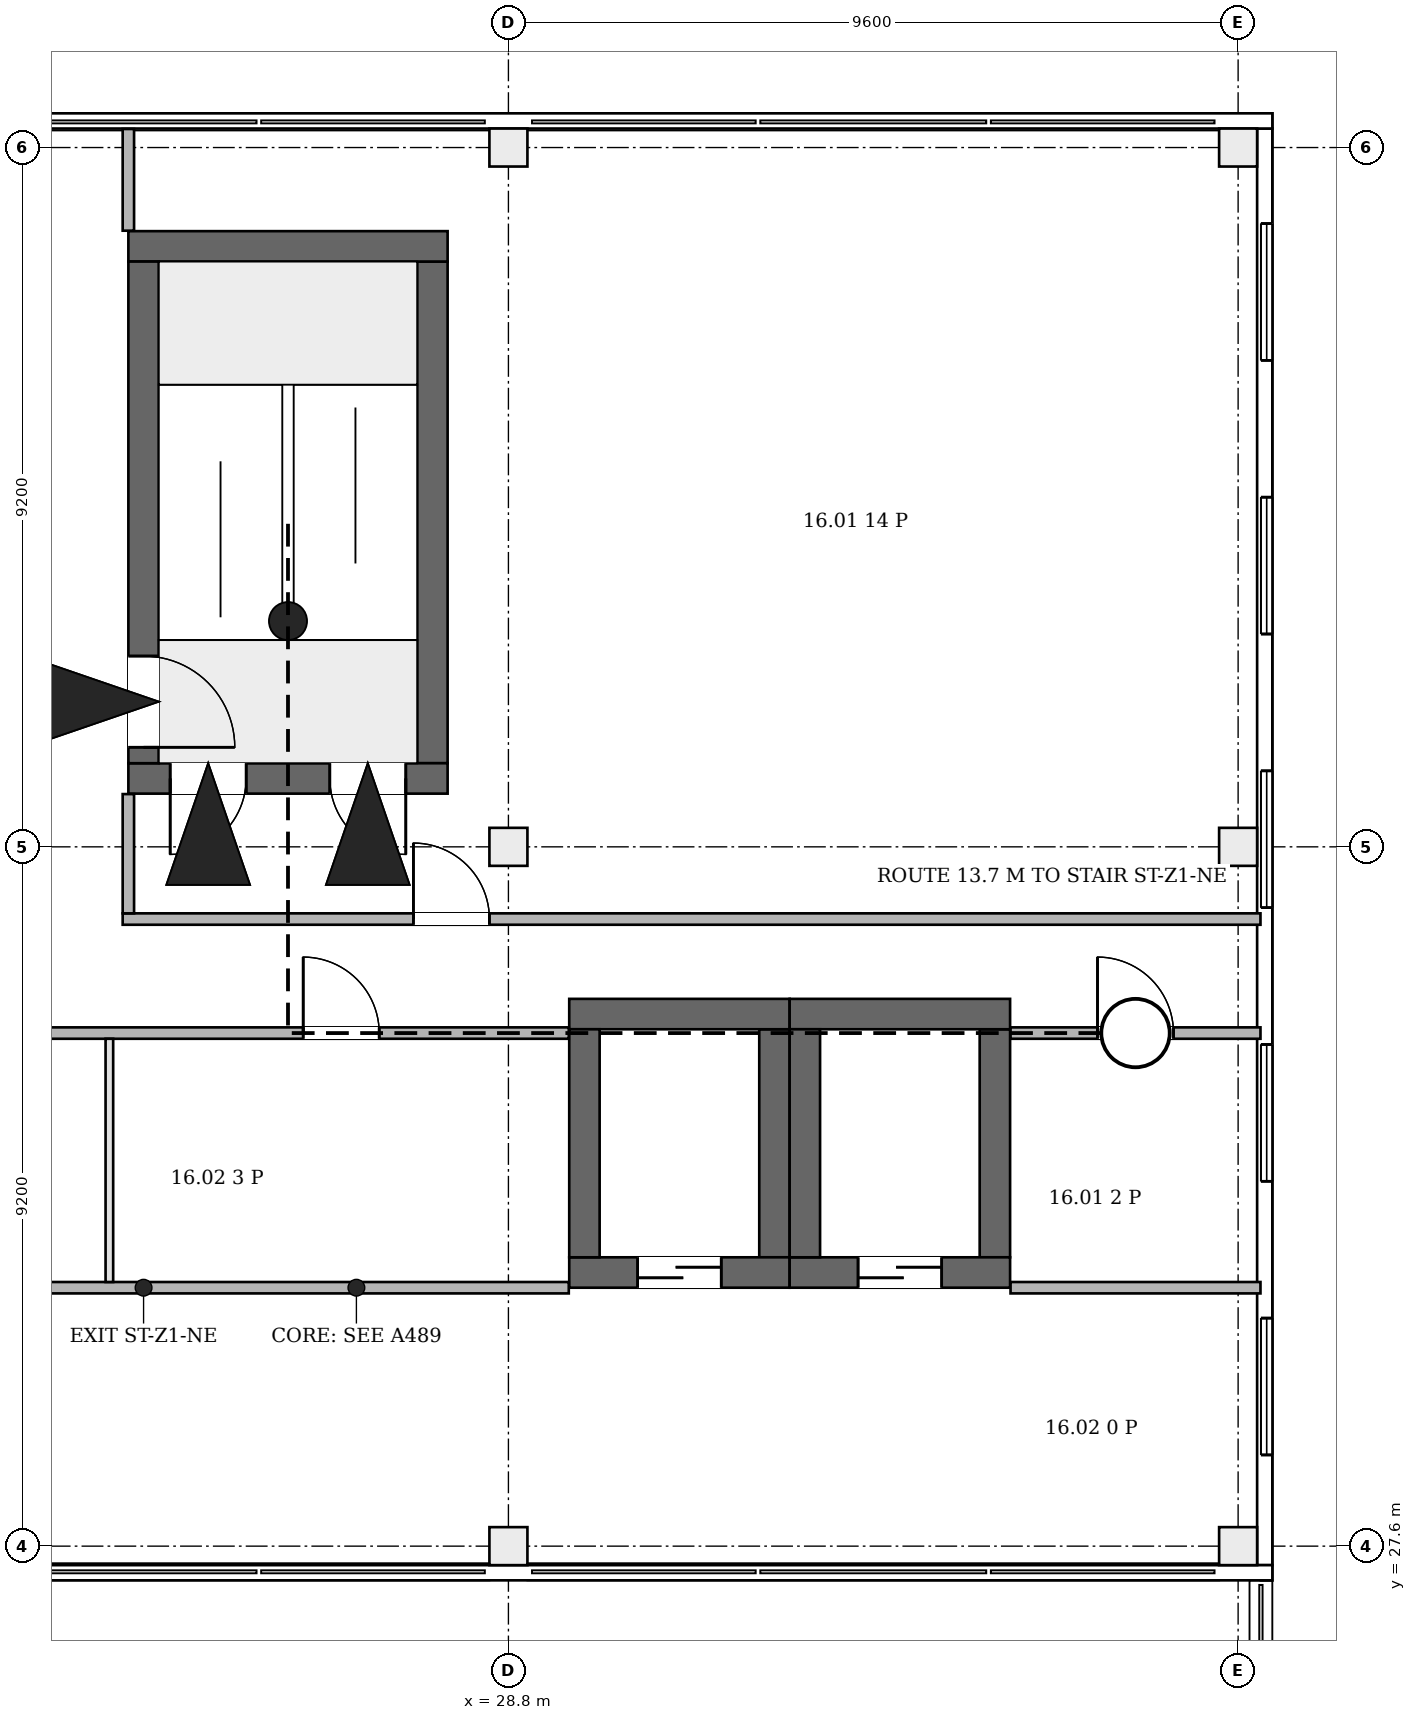
"""IFC4 building model, lengths in metres.
Left out: names, types, materials, properties, quantities, classifications, styles, units other than length and angle.
Written with IfcOpenShell. Run it as: python <this file> out.ifc"""

import sys

from ifc_helpers import new_model, si_unit, direction, frame, frame_2d, origin, origin_2d, place, context, subcontext, project, spatial, rectangle, extrude, element, fill, save


model = new_model("IFC4")
c1 = context("Model", 3, precision=1e-05, world=origin(), true_north=direction((0.0, 1.0)))
c2 = subcontext(c1, "Body", "Model", "MODEL_VIEW")
j1 = project(units=[si_unit("LENGTHUNIT", "METRE"), si_unit("PLANEANGLEUNIT", "RADIAN")], contexts=[c1])
p1 = place(None, origin())
s1 = spatial("IfcSite", under=j1, at=p1, CompositionType="ELEMENT")
p2 = place(p1, origin())
s2 = spatial("IfcBuilding", under=s1, at=p2, CompositionType="ELEMENT")
p3 = place(p2, frame((0.0, 0.0, 78.1)))
s3 = spatial("IfcBuildingStorey", under=s2, at=p3, CompositionType="ELEMENT", Elevation=78.1)
p4 = place(p3, frame((23.8, 37.7, 0.0), z_axis=(0.0, 0.0, 1.0), x_axis=(1.0, 0.0, 0.0)))
e1 = element("IfcWall", 1, at=p4, inside=s3, PredefinedType="SHEAR", context=c2, shape_type="SweptSolid", body=[
    extrude(rectangle(XDim=4.2, YDim=0.4, at=frame_2d((2.1, 0.0))), origin(), (0.0, 0.0, 1.0), 7.1),
])
p5 = place(p4, frame((0.55, 0.0, 4.2)))
e2 = element("IfcOpeningElement", 2, at=p5, cuts=e1, PredefinedType="OPENING", context=c2, shape_type="SweptSolid", body=[
    extrude(rectangle(XDim=1.0, YDim=2.1, at=frame_2d((0.5, 1.05))), frame((0.0, 0.21, 0.0), z_axis=(0.0, -1.0, 0.0), x_axis=(1.0, 0.0, 0.0)), (0.0, 0.0, 1.0), 0.42),
])
p6 = place(p4, frame((2.65, 0.0, 4.2)))
e3 = element("IfcOpeningElement", 3, at=p6, cuts=e1, PredefinedType="OPENING", context=c2, shape_type="SweptSolid", body=[
    extrude(rectangle(XDim=1.0, YDim=2.1, at=frame_2d((0.5, 1.05))), frame((0.0, 0.21, 0.0), z_axis=(0.0, -1.0, 0.0), x_axis=(1.0, 0.0, 0.0)), (0.0, 0.0, 1.0), 0.42),
])
p7 = place(p3, frame((23.8, 44.7, 0.0), z_axis=(0.0, 0.0, 1.0), x_axis=(1.0, 0.0, 0.0)))
e4 = element("IfcWall", 4, at=p7, inside=s3, PredefinedType="SHEAR", context=c2, shape_type="SweptSolid", body=[
    extrude(rectangle(XDim=4.2, YDim=0.4, at=frame_2d((2.1, 0.0))), origin(), (0.0, 0.0, 1.0), 7.1),
])
p8 = place(p3, frame((24.0, 37.9, 0.0), z_axis=(0.0, 0.0, 1.0), x_axis=(0.0, 1.0, 0.0)))
e5 = element("IfcWall", 5, at=p8, inside=s3, PredefinedType="SHEAR", context=c2, shape_type="SweptSolid", body=[
    extrude(rectangle(XDim=6.6, YDim=0.4, at=frame_2d((3.3, 0.0))), origin(), (0.0, 0.0, 1.0), 7.1),
])
p9 = place(p8, frame((0.21, 0.0, 0.0)))
e6 = element("IfcOpeningElement", 6, at=p9, cuts=e5, PredefinedType="OPENING", context=c2, shape_type="SweptSolid", body=[
    extrude(rectangle(XDim=1.2, YDim=2.1, at=frame_2d((0.6, 1.05))), frame((0.0, 0.21, 0.0), z_axis=(0.0, -1.0, 0.0), x_axis=(1.0, 0.0, 0.0)), (0.0, 0.0, 1.0), 0.42),
])
p10 = place(p3, frame((27.8, 37.9, 0.0), z_axis=(0.0, 0.0, 1.0), x_axis=(0.0, 1.0, 0.0)))
e7 = element("IfcWall", 7, at=p10, inside=s3, PredefinedType="SHEAR", context=c2, shape_type="SweptSolid", body=[
    extrude(rectangle(XDim=6.6, YDim=0.4, at=frame_2d((3.3, 0.0))), origin(), (0.0, 0.0, 1.0), 7.1),
])
p11 = place(p3, frame((29.6, 31.2, 0.0), z_axis=(0.0, 0.0, 1.0), x_axis=(1.0, 0.0, 0.0)))
e8 = element("IfcWall", 8, at=p11, inside=s3, PredefinedType="SHEAR", context=c2, shape_type="SweptSolid", body=[
    extrude(rectangle(XDim=2.9, YDim=0.4, at=frame_2d((1.45, 0.0))), origin(), (0.0, 0.0, 1.0), 7.6),
])
p12 = place(p11, frame((0.9, 0.0, 0.0)))
e9 = element("IfcOpeningElement", 9, at=p12, cuts=e8, PredefinedType="OPENING", context=c2, shape_type="SweptSolid", body=[
    extrude(rectangle(XDim=1.1, YDim=2.1, at=frame_2d((0.55, 1.05))), frame((0.0, 0.21, 0.0), z_axis=(0.0, -1.0, 0.0), x_axis=(1.0, 0.0, 0.0)), (0.0, 0.0, 1.0), 0.42),
])
p13 = place(p3, frame((29.6, 34.6, 0.0), z_axis=(0.0, 0.0, 1.0), x_axis=(1.0, 0.0, 0.0)))
e10 = element("IfcWall", 10, at=p13, inside=s3, PredefinedType="SHEAR", context=c2, shape_type="SweptSolid", body=[
    extrude(rectangle(XDim=2.9, YDim=0.4, at=frame_2d((1.45, 0.0))), origin(), (0.0, 0.0, 1.0), 7.6),
])
for number, where, z_axis, x_axis in (
    (11, (29.8, 31.4, 0.0), (0.0, 0.0, 1.0), (0.0, 1.0, 0.0)),
    (12, (32.3, 31.4, 0.0), (0.0, 0.0, 1.0), (0.0, 1.0, 0.0)),
):
    element("IfcWall", number, at=place(p3, frame(where, z_axis=z_axis, x_axis=x_axis)), inside=s3, PredefinedType="SHEAR", context=c2, shape_type="SweptSolid", body=[
        extrude(rectangle(XDim=3.0, YDim=0.4, at=frame_2d((1.5, 0.0))), origin(), (0.0, 0.0, 1.0), 7.6),
    ])
p14 = place(p3, frame((32.5, 31.2, 0.0), z_axis=(0.0, 0.0, 1.0), x_axis=(1.0, 0.0, 0.0)))
e13 = element("IfcWall", 13, at=p14, inside=s3, PredefinedType="SHEAR", context=c2, shape_type="SweptSolid", body=[
    extrude(rectangle(XDim=2.9, YDim=0.4, at=frame_2d((1.45, 0.0))), origin(), (0.0, 0.0, 1.0), 7.6),
])
p15 = place(p14, frame((0.9, 0.0, 0.0)))
e14 = element("IfcOpeningElement", 14, at=p15, cuts=e13, PredefinedType="OPENING", context=c2, shape_type="SweptSolid", body=[
    extrude(rectangle(XDim=1.1, YDim=2.1, at=frame_2d((0.55, 1.05))), frame((0.0, 0.21, 0.0), z_axis=(0.0, -1.0, 0.0), x_axis=(1.0, 0.0, 0.0)), (0.0, 0.0, 1.0), 0.42),
])
p16 = place(p3, frame((32.5, 34.6, 0.0), z_axis=(0.0, 0.0, 1.0), x_axis=(1.0, 0.0, 0.0)))
e15 = element("IfcWall", 15, at=p16, inside=s3, PredefinedType="SHEAR", context=c2, shape_type="SweptSolid", body=[
    extrude(rectangle(XDim=2.9, YDim=0.4, at=frame_2d((1.45, 0.0))), origin(), (0.0, 0.0, 1.0), 7.6),
])
for number, where, z_axis, x_axis in (
    (16, (32.7, 31.4, 0.0), (0.0, 0.0, 1.0), (0.0, 1.0, 0.0)),
    (17, (35.2, 31.4, 0.0), (0.0, 0.0, 1.0), (0.0, 1.0, 0.0)),
):
    element("IfcWall", number, at=place(p3, frame(where, z_axis=z_axis, x_axis=x_axis)), inside=s3, PredefinedType="SHEAR", context=c2, shape_type="SweptSolid", body=[
        extrude(rectangle(XDim=3.0, YDim=0.4, at=frame_2d((1.5, 0.0))), origin(), (0.0, 0.0, 1.0), 7.6),
    ])
for number, where, z_axis, x_axis in (
    (18, (28.8, 27.6, 0.0), (0.0, 0.0, 1.0), (1.0, 0.0, 0.0)),
    (19, (38.4, 27.6, 0.0), (0.0, 0.0, 1.0), (1.0, 0.0, 0.0)),
    (20, (28.8, 36.8, 0.0), (0.0, 0.0, 1.0), (1.0, 0.0, 0.0)),
    (21, (38.4, 36.8, 0.0), (0.0, 0.0, 1.0), (1.0, 0.0, 0.0)),
    (22, (28.8, 46.0, 0.0), (0.0, 0.0, 1.0), (1.0, 0.0, 0.0)),
    (23, (38.4, 46.0, 0.0), (0.0, 0.0, 1.0), (1.0, 0.0, 0.0)),
):
    element("IfcColumn", number, at=place(p3, frame(where, z_axis=z_axis, x_axis=x_axis)), inside=s3, PredefinedType="COLUMN", context=c2, shape_type="SweptSolid", body=[
        extrude(rectangle(XDim=0.5, YDim=0.5, at=origin_2d()), origin(), (0.0, 0.0, 1.0), 3.9),
    ])
p17 = place(p3, frame((38.775, 27.15, 0.0), z_axis=(0.0, 0.0, 1.0), x_axis=(0.0, 1.0, 0.0)))
e24 = element("IfcWall", 24, at=p17, inside=s3, PredefinedType="ELEMENTEDWALL", context=c2, shape_type="SweptSolid", body=[
    extrude(rectangle(XDim=19.3, YDim=0.15, at=frame_2d((9.65, 0.0))), origin(), (0.0, 0.0, 1.0), 3.9),
])
p18 = place(p17, frame((1.65, 0.0, 0.9)))
e25 = element("IfcOpeningElement", 25, at=p18, cuts=e24, PredefinedType="OPENING", context=c2, shape_type="SweptSolid", body=[
    extrude(rectangle(XDim=1.8, YDim=2.6, at=frame_2d((0.9, 1.3))), frame((0.0, 0.085, 0.0), z_axis=(0.0, -1.0, 0.0), x_axis=(1.0, 0.0, 0.0)), (0.0, 0.0, 1.0), 0.17),
])
p19 = place(p17, frame((5.25, 0.0, 0.9)))
e26 = element("IfcOpeningElement", 26, at=p19, cuts=e24, PredefinedType="OPENING", context=c2, shape_type="SweptSolid", body=[
    extrude(rectangle(XDim=1.8, YDim=2.6, at=frame_2d((0.9, 1.3))), frame((0.0, 0.085, 0.0), z_axis=(0.0, -1.0, 0.0), x_axis=(1.0, 0.0, 0.0)), (0.0, 0.0, 1.0), 0.17),
])
p20 = place(p17, frame((8.85, 0.0, 0.9)))
e27 = element("IfcOpeningElement", 27, at=p20, cuts=e24, PredefinedType="OPENING", context=c2, shape_type="SweptSolid", body=[
    extrude(rectangle(XDim=1.8, YDim=2.6, at=frame_2d((0.9, 1.3))), frame((0.0, 0.085, 0.0), z_axis=(0.0, -1.0, 0.0), x_axis=(1.0, 0.0, 0.0)), (0.0, 0.0, 1.0), 0.17),
])
p21 = place(p17, frame((12.45, 0.0, 0.9)))
e28 = element("IfcOpeningElement", 28, at=p21, cuts=e24, PredefinedType="OPENING", context=c2, shape_type="SweptSolid", body=[
    extrude(rectangle(XDim=1.8, YDim=2.6, at=frame_2d((0.9, 1.3))), frame((0.0, 0.085, 0.0), z_axis=(0.0, -1.0, 0.0), x_axis=(1.0, 0.0, 0.0)), (0.0, 0.0, 1.0), 0.17),
])
p22 = place(p17, frame((16.05, 0.0, 0.9)))
e29 = element("IfcOpeningElement", 29, at=p22, cuts=e24, PredefinedType="OPENING", context=c2, shape_type="SweptSolid", body=[
    extrude(rectangle(XDim=1.8, YDim=2.6, at=frame_2d((0.9, 1.3))), frame((0.0, 0.085, 0.0), z_axis=(0.0, -1.0, 0.0), x_axis=(1.0, 0.0, 0.0)), (0.0, 0.0, 1.0), 0.17),
])
for number, where, z_axis, x_axis in (
    (30, (-0.199, 27.25, 4.2), (0.0, 0.0, 1.0), (1.0, 0.0, 0.0)),
    (31, (38.851, 46.35, 4.2), (0.0, 0.0, 1.0), (-1.0, 0.0, 0.0)),
):
    element("IfcWall", number, at=place(p3, frame(where, z_axis=z_axis, x_axis=x_axis)), inside=s3, PredefinedType="PARAPET", context=c2, shape_type="SweptSolid", body=[
        extrude(rectangle(XDim=39.05, YDim=0.2, at=frame_2d((19.525, 0.0))), origin(), (0.0, 0.0, 1.0), 1.1),
    ])
p23 = place(p3, frame((38.75, 27.35, 4.2), z_axis=(0.0, 0.0, 1.0), x_axis=(0.0, 1.0, 0.0)))
e32 = element("IfcWall", 32, at=p23, inside=s3, PredefinedType="PARAPET", context=c2, shape_type="SweptSolid", body=[
    extrude(rectangle(XDim=18.9, YDim=0.2, at=frame_2d((9.45, 0.0))), origin(), (0.0, 0.0, 1.0), 1.1),
])
p24 = place(p3, frame((17.425, 31.0, 0.0), z_axis=(0.0, 0.0, 1.0), x_axis=(1.0, 0.0, 0.0)))
e33 = element("IfcWall", 33, at=p24, inside=s3, PredefinedType="PARTITIONING", context=c2, shape_type="SweptSolid", body=[
    extrude(rectangle(XDim=12.169, YDim=0.15, at=frame_2d((6.084, 0.0))), origin(), (0.0, 0.0, 1.0), 3.9),
])
p25 = place(p3, frame((17.425, 34.35, 0.0), z_axis=(0.0, 0.0, 1.0), x_axis=(1.0, 0.0, 0.0)))
e34 = element("IfcWall", 34, at=p25, inside=s3, PredefinedType="PARTITIONING", context=c2, shape_type="SweptSolid", body=[
    extrude(rectangle(XDim=12.169, YDim=0.15, at=frame_2d((6.084, 0.0))), origin(), (0.0, 0.0, 1.0), 3.9),
])
p26 = place(p25, frame((2.575, 0.0, 0.0)))
e35 = element("IfcOpeningElement", 35, at=p26, cuts=e34, PredefinedType="OPENING", context=c2, shape_type="SweptSolid", body=[
    extrude(rectangle(XDim=1.0, YDim=2.1, at=frame_2d((0.5, 1.05))), frame((0.0, 0.085, 0.0), z_axis=(0.0, -1.0, 0.0), x_axis=(1.0, 0.0, 0.0)), (0.0, 0.0, 1.0), 0.17),
])
p27 = place(p25, frame((8.675, 0.0, 0.0)))
e36 = element("IfcOpeningElement", 36, at=p27, cuts=e34, PredefinedType="OPENING", context=c2, shape_type="SweptSolid", body=[
    extrude(rectangle(XDim=1.0, YDim=2.1, at=frame_2d((0.5, 1.05))), frame((0.0, 0.085, 0.0), z_axis=(0.0, -1.0, 0.0), x_axis=(1.0, 0.0, 0.0)), (0.0, 0.0, 1.0), 0.17),
])
p28 = place(p3, frame((23.55, 31.075, 0.0), z_axis=(0.0, 0.0, 1.0), x_axis=(0.0, 1.0, 0.0)))
e37 = element("IfcWall", 37, at=p28, inside=s3, PredefinedType="PARTITIONING", context=c2, shape_type="SweptSolid", body=[
    extrude(rectangle(XDim=3.2, YDim=0.1, at=frame_2d((1.6, 0.0))), origin(), (0.0, 0.0, 1.0), 3.9),
])
p29 = place(p3, frame((23.725, 35.85, 0.0), z_axis=(0.0, 0.0, 1.0), x_axis=(1.0, 0.0, 0.0)))
e38 = element("IfcWall", 38, at=p29, inside=s3, PredefinedType="PARTITIONING", context=c2, shape_type="SweptSolid", body=[
    extrude(rectangle(XDim=14.969, YDim=0.15, at=frame_2d((7.484, 0.0))), origin(), (0.0, 0.0, 1.0), 3.9),
])
p30 = place(p29, frame((3.825, 0.0, 0.0)))
e39 = element("IfcOpeningElement", 39, at=p30, cuts=e38, PredefinedType="OPENING", context=c2, shape_type="SweptSolid", body=[
    extrude(rectangle(XDim=1.0, YDim=2.1, at=frame_2d((0.5, 1.05))), frame((0.0, 0.085, 0.0), z_axis=(0.0, -1.0, 0.0), x_axis=(1.0, 0.0, 0.0)), (0.0, 0.0, 1.0), 0.17),
])
p31 = place(p3, frame((23.8, 35.925, 0.0), z_axis=(0.0, 0.0, 1.0), x_axis=(0.0, 1.0, 0.0)))
e40 = element("IfcWall", 40, at=p31, inside=s3, PredefinedType="PARTITIONING", context=c2, shape_type="SweptSolid", body=[
    extrude(rectangle(XDim=1.569, YDim=0.15, at=frame_2d((0.784, 0.0))), origin(), (0.0, 0.0, 1.0), 3.9),
])
p32 = place(p3, frame((23.8, 44.906, 0.0), z_axis=(0.0, 0.0, 1.0), x_axis=(0.0, 1.0, 0.0)))
e41 = element("IfcWall", 41, at=p32, inside=s3, PredefinedType="PARTITIONING", context=c2, shape_type="SweptSolid", body=[
    extrude(rectangle(XDim=1.338, YDim=0.15, at=frame_2d((0.669, 0.0))), origin(), (0.0, 0.0, 1.0), 3.9),
])
p33 = place(p3, frame((35.406, 31.0, 0.0), z_axis=(0.0, 0.0, 1.0), x_axis=(1.0, 0.0, 0.0)))
e42 = element("IfcWall", 42, at=p33, inside=s3, PredefinedType="PARTITIONING", context=c2, shape_type="SweptSolid", body=[
    extrude(rectangle(XDim=3.288, YDim=0.15, at=frame_2d((1.644, 0.0))), origin(), (0.0, 0.0, 1.0), 3.9),
])
p34 = place(p3, frame((35.406, 34.35, 0.0), z_axis=(0.0, 0.0, 1.0), x_axis=(1.0, 0.0, 0.0)))
e43 = element("IfcWall", 43, at=p34, inside=s3, PredefinedType="PARTITIONING", context=c2, shape_type="SweptSolid", body=[
    extrude(rectangle(XDim=3.288, YDim=0.15, at=frame_2d((1.644, 0.0))), origin(), (0.0, 0.0, 1.0), 3.9),
])
p35 = place(p34, frame((1.144, 0.0, 0.0)))
e44 = element("IfcOpeningElement", 44, at=p35, cuts=e43, PredefinedType="OPENING", context=c2, shape_type="SweptSolid", body=[
    extrude(rectangle(XDim=1.0, YDim=2.1, at=frame_2d((0.5, 1.05))), frame((0.0, 0.085, 0.0), z_axis=(0.0, -1.0, 0.0), x_axis=(1.0, 0.0, 0.0)), (0.0, 0.0, 1.0), 0.17),
])
p36 = place(p18, origin())
e45 = element("IfcWindow", 45, at=p36, inside=s3, PartitioningType="SINGLE_PANEL", PredefinedType="WINDOW", context=c2, shape_type="SweptSolid", body=[
    extrude(rectangle(XDim=1.8, YDim=2.6, at=frame_2d((0.9, 1.3))), frame((0.0, 0.03, 0.0), z_axis=(0.0, -1.0, 0.0), x_axis=(1.0, 0.0, 0.0)), (0.0, 0.0, 1.0), 0.06),
])
fill(e25, e45)
p37 = place(p19, origin())
e46 = element("IfcWindow", 46, at=p37, inside=s3, PartitioningType="SINGLE_PANEL", PredefinedType="WINDOW", context=c2, shape_type="SweptSolid", body=[
    extrude(rectangle(XDim=1.8, YDim=2.6, at=frame_2d((0.9, 1.3))), frame((0.0, 0.03, 0.0), z_axis=(0.0, -1.0, 0.0), x_axis=(1.0, 0.0, 0.0)), (0.0, 0.0, 1.0), 0.06),
])
fill(e26, e46)
p38 = place(p20, origin())
e47 = element("IfcWindow", 47, at=p38, inside=s3, PartitioningType="SINGLE_PANEL", PredefinedType="WINDOW", context=c2, shape_type="SweptSolid", body=[
    extrude(rectangle(XDim=1.8, YDim=2.6, at=frame_2d((0.9, 1.3))), frame((0.0, 0.03, 0.0), z_axis=(0.0, -1.0, 0.0), x_axis=(1.0, 0.0, 0.0)), (0.0, 0.0, 1.0), 0.06),
])
fill(e27, e47)
p39 = place(p21, origin())
e48 = element("IfcWindow", 48, at=p39, inside=s3, PartitioningType="SINGLE_PANEL", PredefinedType="WINDOW", context=c2, shape_type="SweptSolid", body=[
    extrude(rectangle(XDim=1.8, YDim=2.6, at=frame_2d((0.9, 1.3))), frame((0.0, 0.03, 0.0), z_axis=(0.0, -1.0, 0.0), x_axis=(1.0, 0.0, 0.0)), (0.0, 0.0, 1.0), 0.06),
])
fill(e28, e48)
p40 = place(p22, origin())
e49 = element("IfcWindow", 49, at=p40, inside=s3, PartitioningType="SINGLE_PANEL", PredefinedType="WINDOW", context=c2, shape_type="SweptSolid", body=[
    extrude(rectangle(XDim=1.8, YDim=2.6, at=frame_2d((0.9, 1.3))), frame((0.0, 0.03, 0.0), z_axis=(0.0, -1.0, 0.0), x_axis=(1.0, 0.0, 0.0)), (0.0, 0.0, 1.0), 0.06),
])
fill(e29, e49)
p41 = place(p9, origin())
e50 = element("IfcDoor", 50, at=p41, inside=s3, OperationType="SINGLE_SWING_LEFT", PredefinedType="DOOR", context=c2, shape_type="SweptSolid", body=[
    extrude(rectangle(XDim=1.2, YDim=2.1, at=frame_2d((0.6, 1.05))), frame((0.0, 0.025, 0.0), z_axis=(0.0, -1.0, 0.0), x_axis=(1.0, 0.0, 0.0)), (0.0, 0.0, 1.0), 0.05),
])
fill(e6, e50)
p42 = place(p5, frame((1.0, 0.0, 0.0), z_axis=(0.0, 0.0, 1.0), x_axis=(-1.0, 0.0, 0.0)))
e51 = element("IfcDoor", 51, at=p42, inside=s3, OperationType="SINGLE_SWING_LEFT", PredefinedType="DOOR", context=c2, shape_type="SweptSolid", body=[
    extrude(rectangle(XDim=1.0, YDim=2.1, at=frame_2d((0.5, 1.05))), frame((0.0, 0.025, 0.0), z_axis=(0.0, -1.0, 0.0), x_axis=(1.0, 0.0, 0.0)), (0.0, 0.0, 1.0), 0.05),
])
fill(e2, e51)
p43 = place(p6, frame((1.0, 0.0, 0.0), z_axis=(0.0, 0.0, 1.0), x_axis=(-1.0, 0.0, 0.0)))
e52 = element("IfcDoor", 52, at=p43, inside=s3, OperationType="SINGLE_SWING_RIGHT", PredefinedType="DOOR", context=c2, shape_type="SweptSolid", body=[
    extrude(rectangle(XDim=1.0, YDim=2.1, at=frame_2d((0.5, 1.05))), frame((0.0, 0.025, 0.0), z_axis=(0.0, -1.0, 0.0), x_axis=(1.0, 0.0, 0.0)), (0.0, 0.0, 1.0), 0.05),
])
fill(e3, e52)
p44 = place(p12, origin())
e53 = element("IfcDoor", 53, at=p44, inside=s3, OperationType="DOUBLE_DOOR_SLIDING", PredefinedType="DOOR", context=c2, shape_type="SweptSolid", body=[
    extrude(rectangle(XDim=1.1, YDim=2.1, at=frame_2d((0.55, 1.05))), frame((0.0, 0.025, 0.0), z_axis=(0.0, -1.0, 0.0), x_axis=(1.0, 0.0, 0.0)), (0.0, 0.0, 1.0), 0.05),
])
fill(e9, e53)
p45 = place(p15, origin())
e54 = element("IfcDoor", 54, at=p45, inside=s3, OperationType="DOUBLE_DOOR_SLIDING", PredefinedType="DOOR", context=c2, shape_type="SweptSolid", body=[
    extrude(rectangle(XDim=1.1, YDim=2.1, at=frame_2d((0.55, 1.05))), frame((0.0, 0.025, 0.0), z_axis=(0.0, -1.0, 0.0), x_axis=(1.0, 0.0, 0.0)), (0.0, 0.0, 1.0), 0.05),
])
fill(e14, e54)
p46 = place(p27, origin())
e55 = element("IfcDoor", 55, at=p46, inside=s3, OperationType="SINGLE_SWING_LEFT", PredefinedType="DOOR", context=c2, shape_type="SweptSolid", body=[
    extrude(rectangle(XDim=1.0, YDim=2.1, at=frame_2d((0.5, 1.05))), frame((0.0, 0.025, 0.0), z_axis=(0.0, -1.0, 0.0), x_axis=(1.0, 0.0, 0.0)), (0.0, 0.0, 1.0), 0.05),
])
fill(e36, e55)
p47 = place(p35, origin())
e56 = element("IfcDoor", 56, at=p47, inside=s3, OperationType="SINGLE_SWING_LEFT", PredefinedType="DOOR", context=c2, shape_type="SweptSolid", body=[
    extrude(rectangle(XDim=1.0, YDim=2.1, at=frame_2d((0.5, 1.05))), frame((0.0, 0.025, 0.0), z_axis=(0.0, -1.0, 0.0), x_axis=(1.0, 0.0, 0.0)), (0.0, 0.0, 1.0), 0.05),
])
fill(e44, e56)
p48 = place(p30, origin())
e57 = element("IfcDoor", 57, at=p48, inside=s3, OperationType="SINGLE_SWING_RIGHT", PredefinedType="DOOR", context=c2, shape_type="SweptSolid", body=[
    extrude(rectangle(XDim=1.0, YDim=2.1, at=frame_2d((0.5, 1.05))), frame((0.0, 0.025, 0.0), z_axis=(0.0, -1.0, 0.0), x_axis=(1.0, 0.0, 0.0)), (0.0, 0.0, 1.0), 0.05),
])
fill(e39, e57)
save(model, sys.argv[1])
